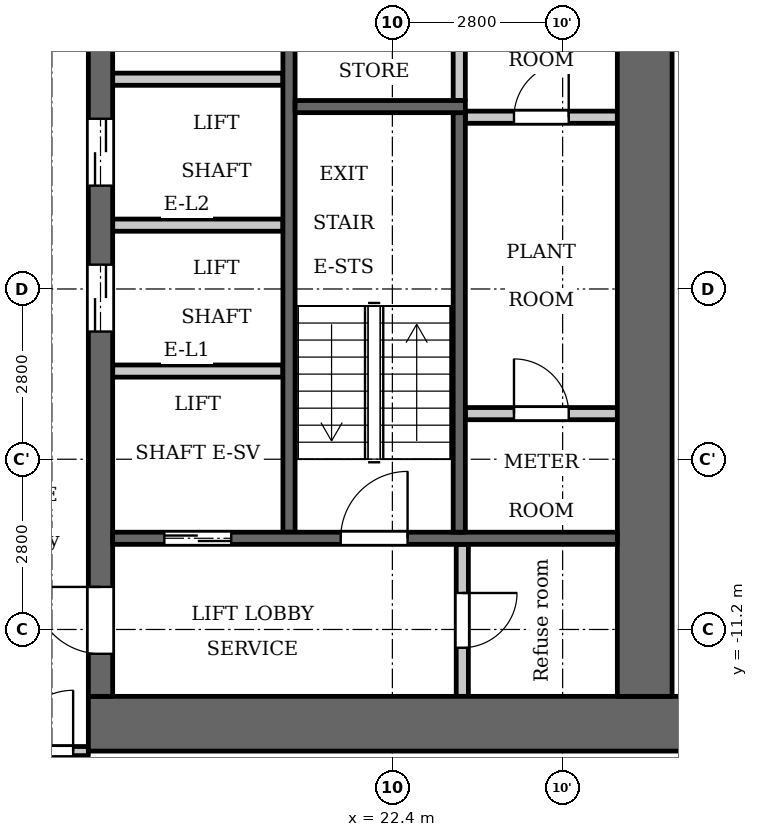
"""IFC4 building model, lengths in metres.
Left out: names, types, materials, properties, quantities, classifications, styles, units other than length and angle.
Written with IfcOpenShell. Run it as: python <this file> out.ifc"""

import sys

from ifc_helpers import new_model, si_unit, direction, frame, frame_2d, origin, place, context, subcontext, project, spatial, rectangle, extrude, element, fill, save


model = new_model("IFC4")
c1 = context("Model", 3, precision=1e-05, world=origin(), true_north=direction((0.0, 1.0)))
c2 = subcontext(c1, "Body", "Model", "MODEL_VIEW")
j1 = project(units=[si_unit("LENGTHUNIT", "METRE"), si_unit("PLANEANGLEUNIT", "RADIAN")], contexts=[c1])
p1 = place(None, origin())
s1 = spatial("IfcSite", under=j1, at=p1, CompositionType="ELEMENT")
p2 = place(p1, origin())
s2 = spatial("IfcBuilding", under=s1, at=p2, CompositionType="ELEMENT")
p3 = place(p2, frame((0.0, 0.0, 83.3)))
s3 = spatial("IfcBuildingStorey", under=s2, at=p3, CompositionType="ELEMENT", Elevation=83.3)
p4 = place(p3, frame((23.5, -2.5, 0.0), z_axis=(0.0, 0.0, 1.0), x_axis=(0.0, 1.0, 0.0)))
e1 = element("IfcWall", 1, at=p4, inside=s3, PredefinedType="PARTITIONING", context=c2, shape_type="SweptSolid", body=[
    extrude(rectangle(XDim=2.65, YDim=0.2, at=frame_2d((1.325, 0.0))), origin(), (0.0, 0.0, 1.0), 3.2),
])
p5 = place(p3, frame((20.7, -9.6, 0.0), z_axis=(0.0, 0.0, 1.0), x_axis=(0.0, 1.0, 0.0)))
e2 = element("IfcWall", 2, at=p5, inside=s3, PredefinedType="SHEAR", context=c2, shape_type="SweptSolid", body=[
    extrude(rectangle(XDim=9.75, YDim=0.2, at=frame_2d((4.875, 0.0))), origin(), (0.0, 0.0, 1.0), 3.2),
])
p6 = place(p3, frame((17.4, -12.75, 0.0), z_axis=(0.0, 0.0, 1.0), x_axis=(1.0, 0.0, 0.0)))
e3 = element("IfcWall", 3, at=p6, inside=s3, PredefinedType="SHEAR", context=c2, shape_type="SweptSolid", body=[
    extrude(rectangle(XDim=10.4, YDim=0.9, at=frame_2d((5.2, 0.0))), origin(), (0.0, 0.0, 1.0), 3.2),
])
p7 = place(p3, frame((17.6, -12.3, 0.0), z_axis=(0.0, 0.0, 1.0), x_axis=(0.0, 1.0, 0.0)))
e4 = element("IfcWall", 4, at=p7, inside=s3, PredefinedType="SHEAR", context=c2, shape_type="SweptSolid", body=[
    extrude(rectangle(XDim=24.6, YDim=0.4, at=frame_2d((12.3, 0.0))), origin(), (0.0, 0.0, 1.0), 3.2),
])
p8 = place(p7, frame((6.0, 0.0, 0.0)))
e5 = element("IfcOpeningElement", 5, at=p8, cuts=e4, PredefinedType="OPENING", context=c2, shape_type="SweptSolid", body=[
    extrude(rectangle(XDim=1.1, YDim=2.1, at=frame_2d((0.55, 1.05))), frame((0.0, 0.21, 0.0), z_axis=(0.0, -1.0, 0.0), x_axis=(1.0, 0.0, 0.0)), (0.0, 0.0, 1.0), 0.42),
])
p9 = place(p7, frame((8.4, 0.0, 0.0)))
e6 = element("IfcOpeningElement", 6, at=p9, cuts=e4, PredefinedType="OPENING", context=c2, shape_type="SweptSolid", body=[
    extrude(rectangle(XDim=1.1, YDim=2.1, at=frame_2d((0.55, 1.05))), frame((0.0, 0.21, 0.0), z_axis=(0.0, -1.0, 0.0), x_axis=(1.0, 0.0, 0.0)), (0.0, 0.0, 1.0), 0.42),
])
p10 = place(p7, frame((10.8, 0.0, 0.0)))
e7 = element("IfcOpeningElement", 7, at=p10, cuts=e4, PredefinedType="OPENING", context=c2, shape_type="SweptSolid", body=[
    extrude(rectangle(XDim=1.1, YDim=2.1, at=frame_2d((0.55, 1.05))), frame((0.0, 0.21, 0.0), z_axis=(0.0, -1.0, 0.0), x_axis=(1.0, 0.0, 0.0)), (0.0, 0.0, 1.0), 0.42),
])
p11 = place(p7, frame((16.75, 0.0, 0.0)))
e8 = element("IfcOpeningElement", 8, at=p11, cuts=e4, PredefinedType="OPENING", context=c2, shape_type="SweptSolid", body=[
    extrude(rectangle(XDim=0.9, YDim=2.1, at=frame_2d((0.45, 1.05))), frame((0.0, 0.21, 0.0), z_axis=(0.0, -1.0, 0.0), x_axis=(1.0, 0.0, 0.0)), (0.0, 0.0, 1.0), 0.42),
])
p12 = place(p7, frame((22.8, 0.0, 0.0)))
e9 = element("IfcOpeningElement", 9, at=p12, cuts=e4, PredefinedType="OPENING", context=c2, shape_type="SweptSolid", body=[
    extrude(rectangle(XDim=1.1, YDim=2.1, at=frame_2d((0.55, 1.05))), frame((0.0, 0.21, 0.0), z_axis=(0.0, -1.0, 0.0), x_axis=(1.0, 0.0, 0.0)), (0.0, 0.0, 1.0), 0.42),
])
p13 = place(p7, frame((0.7, 0.0, 0.0)))
e10 = element("IfcOpeningElement", 10, at=p13, cuts=e4, PredefinedType="OPENING", context=c2, shape_type="SweptSolid", body=[
    extrude(rectangle(XDim=1.1, YDim=2.1, at=frame_2d((0.55, 1.05))), frame((0.0, 0.21, 0.0), z_axis=(0.0, -1.0, 0.0), x_axis=(1.0, 0.0, 0.0)), (0.0, 0.0, 1.0), 0.42),
])
p14 = place(p7, frame((12.775, 0.0, 0.0)))
e11 = element("IfcOpeningElement", 11, at=p14, cuts=e4, PredefinedType="OPENING", context=c2, shape_type="SweptSolid", body=[
    extrude(rectangle(XDim=1.8, YDim=2.1, at=frame_2d((0.9, 1.05))), frame((0.0, 0.21, 0.0), z_axis=(0.0, -1.0, 0.0), x_axis=(1.0, 0.0, 0.0)), (0.0, 0.0, 1.0), 0.42),
])
p15 = place(p3, frame((26.55, -12.3, 0.0), z_axis=(0.0, 0.0, 1.0), x_axis=(0.0, 1.0, 0.0)))
e12 = element("IfcWall", 12, at=p15, inside=s3, PredefinedType="SHEAR", context=c2, shape_type="SweptSolid", body=[
    extrude(rectangle(XDim=24.6, YDim=0.9, at=frame_2d((12.3, 0.0))), origin(), (0.0, 0.0, 1.0), 3.2),
])
p16 = place(p3, frame((23.55, -12.3, 0.0), z_axis=(0.0, 0.0, 1.0), x_axis=(0.0, 1.0, 0.0)))
e13 = element("IfcWall", 13, at=p16, inside=s3, PredefinedType="PARTITIONING", context=c2, shape_type="SweptSolid", body=[
    extrude(rectangle(XDim=2.5, YDim=0.2, at=frame_2d((1.25, 0.0))), origin(), (0.0, 0.0, 1.0), 3.2),
])
p17 = place(p16, frame((0.8, 0.0, 0.0)))
e14 = element("IfcOpeningElement", 14, at=p17, cuts=e13, PredefinedType="OPENING", context=c2, shape_type="SweptSolid", body=[
    extrude(rectangle(XDim=0.9, YDim=2.1, at=frame_2d((0.45, 1.05))), frame((0.0, 0.11, 0.0), z_axis=(0.0, -1.0, 0.0), x_axis=(1.0, 0.0, 0.0)), (0.0, 0.0, 1.0), 0.22),
])
p18 = place(p3, frame((23.6, -7.65, 0.0), z_axis=(0.0, 0.0, 1.0), x_axis=(1.0, 0.0, 0.0)))
e15 = element("IfcWall", 15, at=p18, inside=s3, PredefinedType="PARTITIONING", context=c2, shape_type="SweptSolid", body=[
    extrude(rectangle(XDim=2.5, YDim=0.2, at=frame_2d((1.25, 0.0))), origin(), (0.0, 0.0, 1.0), 3.2),
])
p19 = place(p18, frame((0.8, 0.0, 0.0)))
e16 = element("IfcOpeningElement", 16, at=p19, cuts=e15, PredefinedType="OPENING", context=c2, shape_type="SweptSolid", body=[
    extrude(rectangle(XDim=0.9, YDim=2.1, at=frame_2d((0.45, 1.05))), frame((0.0, 0.11, 0.0), z_axis=(0.0, -1.0, 0.0), x_axis=(1.0, 0.0, 0.0)), (0.0, 0.0, 1.0), 0.22),
])
p20 = place(p3, frame((23.6, -2.775, 0.0), z_axis=(0.0, 0.0, 1.0), x_axis=(1.0, 0.0, 0.0)))
e17 = element("IfcWall", 17, at=p20, inside=s3, PredefinedType="PARTITIONING", context=c2, shape_type="SweptSolid", body=[
    extrude(rectangle(XDim=2.5, YDim=0.2, at=frame_2d((1.25, 0.0))), origin(), (0.0, 0.0, 1.0), 3.2),
])
p21 = place(p20, frame((0.8, 0.0, 0.0)))
e18 = element("IfcOpeningElement", 18, at=p21, cuts=e17, PredefinedType="OPENING", context=c2, shape_type="SweptSolid", body=[
    extrude(rectangle(XDim=0.9, YDim=2.1, at=frame_2d((0.45, 1.05))), frame((0.0, 0.11, 0.0), z_axis=(0.0, -1.0, 0.0), x_axis=(1.0, 0.0, 0.0)), (0.0, 0.0, 1.0), 0.22),
])
p22 = place(p3, frame((17.8, -9.7, 0.0), z_axis=(0.0, 0.0, 1.0), x_axis=(1.0, 0.0, 0.0)))
e19 = element("IfcWall", 19, at=p22, inside=s3, PredefinedType="SHEAR", context=c2, shape_type="SweptSolid", body=[
    extrude(rectangle(XDim=8.3, YDim=0.2, at=frame_2d((4.15, 0.0))), origin(), (0.0, 0.0, 1.0), 3.2),
])
p23 = place(p22, frame((0.85, 0.0, 0.0)))
e20 = element("IfcOpeningElement", 20, at=p23, cuts=e19, PredefinedType="OPENING", context=c2, shape_type="SweptSolid", body=[
    extrude(rectangle(XDim=1.1, YDim=2.1, at=frame_2d((0.55, 1.05))), frame((0.0, 0.11, 0.0), z_axis=(0.0, -1.0, 0.0), x_axis=(1.0, 0.0, 0.0)), (0.0, 0.0, 1.0), 0.22),
])
p24 = place(p22, frame((3.75, 0.0, 0.0)))
e21 = element("IfcOpeningElement", 21, at=p24, cuts=e19, PredefinedType="OPENING", context=c2, shape_type="SweptSolid", body=[
    extrude(rectangle(XDim=1.1, YDim=2.1, at=frame_2d((0.55, 1.05))), frame((0.0, 0.11, 0.0), z_axis=(0.0, -1.0, 0.0), x_axis=(1.0, 0.0, 0.0)), (0.0, 0.0, 1.0), 0.22),
])
for number, where, z_axis, x_axis in (
    (22, (17.8, -6.95, 0.0), (0.0, 0.0, 1.0), (1.0, 0.0, 0.0)),
    (23, (17.8, -4.55, 0.0), (0.0, 0.0, 1.0), (1.0, 0.0, 0.0)),
    (24, (17.8, -2.15, 0.0), (0.0, 0.0, 1.0), (1.0, 0.0, 0.0)),
):
    element("IfcWall", number, at=place(p3, frame(where, z_axis=z_axis, x_axis=x_axis)), inside=s3, PredefinedType="PARTITIONING", context=c2, shape_type="SweptSolid", body=[
        extrude(rectangle(XDim=2.8, YDim=0.2, at=frame_2d((1.4, 0.0))), origin(), (0.0, 0.0, 1.0), 3.2),
    ])
p25 = place(p3, frame((23.5, -9.6, 0.0), z_axis=(0.0, 0.0, 1.0), x_axis=(0.0, 1.0, 0.0)))
e25 = element("IfcWall", 25, at=p25, inside=s3, PredefinedType="SHEAR", context=c2, shape_type="SweptSolid", body=[
    extrude(rectangle(XDim=6.9, YDim=0.2, at=frame_2d((3.45, 0.0))), origin(), (0.0, 0.0, 1.0), 3.2),
])
p26 = place(p3, frame((20.8, -2.6, 0.0), z_axis=(0.0, 0.0, 1.0), x_axis=(1.0, 0.0, 0.0)))
e26 = element("IfcWall", 26, at=p26, inside=s3, PredefinedType="SHEAR", context=c2, shape_type="SweptSolid", body=[
    extrude(rectangle(XDim=2.8, YDim=0.2, at=frame_2d((1.4, 0.0))), origin(), (0.0, 0.0, 1.0), 3.2),
])
p27 = place(p3, frame((-17.4, -13.2, 0.0), z_axis=(0.0, 0.0, 1.0), x_axis=(1.0, 0.0, 0.0)))
e27 = element("IfcWall", 27, at=p27, inside=s3, PredefinedType="PARTITIONING", context=c2, shape_type="SweptSolid", body=[
    extrude(rectangle(XDim=34.8, YDim=0.15, at=frame_2d((17.4, 0.0))), origin(), (0.0, 0.0, 1.0), 3.2),
])
p28 = place(p27, frame((0.15, 0.0, 0.0)))
e28 = element("IfcOpeningElement", 28, at=p28, cuts=e27, PredefinedType="OPENING", context=c2, shape_type="SweptSolid", body=[
    extrude(rectangle(XDim=1.0, YDim=2.1, at=frame_2d((0.5, 1.05))), frame((0.0, 0.085, 0.0), z_axis=(0.0, -1.0, 0.0), x_axis=(1.0, 0.0, 0.0)), (0.0, 0.0, 1.0), 0.17),
])
p29 = place(p27, frame((33.55, 0.0, 0.0)))
e29 = element("IfcOpeningElement", 29, at=p29, cuts=e27, PredefinedType="OPENING", context=c2, shape_type="SweptSolid", body=[
    extrude(rectangle(XDim=1.0, YDim=2.1, at=frame_2d((0.5, 1.05))), frame((0.0, 0.085, 0.0), z_axis=(0.0, -1.0, 0.0), x_axis=(1.0, 0.0, 0.0)), (0.0, 0.0, 1.0), 0.17),
])
p30 = place(p27, frame((7.35, 0.0, 0.0)))
e30 = element("IfcOpeningElement", 30, at=p30, cuts=e27, PredefinedType="OPENING", context=c2, shape_type="SweptSolid", body=[
    extrude(rectangle(XDim=1.0, YDim=2.1, at=frame_2d((0.5, 1.05))), frame((0.0, 0.085, 0.0), z_axis=(0.0, -1.0, 0.0), x_axis=(1.0, 0.0, 0.0)), (0.0, 0.0, 1.0), 0.17),
])
p31 = place(p27, frame((13.7, 0.0, 0.0)))
e31 = element("IfcOpeningElement", 31, at=p31, cuts=e27, PredefinedType="OPENING", context=c2, shape_type="SweptSolid", body=[
    extrude(rectangle(XDim=1.0, YDim=2.1, at=frame_2d((0.5, 1.05))), frame((0.0, 0.085, 0.0), z_axis=(0.0, -1.0, 0.0), x_axis=(1.0, 0.0, 0.0)), (0.0, 0.0, 1.0), 0.17),
])
p32 = place(p27, frame((19.3, 0.0, 0.0)))
e32 = element("IfcOpeningElement", 32, at=p32, cuts=e27, PredefinedType="OPENING", context=c2, shape_type="SweptSolid", body=[
    extrude(rectangle(XDim=1.0, YDim=2.1, at=frame_2d((0.5, 1.05))), frame((0.0, 0.085, 0.0), z_axis=(0.0, -1.0, 0.0), x_axis=(1.0, 0.0, 0.0)), (0.0, 0.0, 1.0), 0.17),
])
p33 = place(p23, origin())
e33 = element("IfcDoor", 33, at=p33, inside=s3, OperationType="DOUBLE_DOOR_SLIDING", PredefinedType="DOOR", context=c2, shape_type="SweptSolid", body=[
    extrude(rectangle(XDim=1.1, YDim=2.1, at=frame_2d((0.55, 1.05))), frame((0.0, 0.025, 0.0), z_axis=(0.0, -1.0, 0.0), x_axis=(1.0, 0.0, 0.0)), (0.0, 0.0, 1.0), 0.05),
])
fill(e20, e33)
p34 = place(p8, origin())
e34 = element("IfcDoor", 34, at=p34, inside=s3, OperationType="DOUBLE_DOOR_SLIDING", PredefinedType="DOOR", context=c2, shape_type="SweptSolid", body=[
    extrude(rectangle(XDim=1.1, YDim=2.1, at=frame_2d((0.55, 1.05))), frame((0.0, 0.025, 0.0), z_axis=(0.0, -1.0, 0.0), x_axis=(1.0, 0.0, 0.0)), (0.0, 0.0, 1.0), 0.05),
])
fill(e5, e34)
p35 = place(p9, origin())
e35 = element("IfcDoor", 35, at=p35, inside=s3, OperationType="DOUBLE_DOOR_SLIDING", PredefinedType="DOOR", context=c2, shape_type="SweptSolid", body=[
    extrude(rectangle(XDim=1.1, YDim=2.1, at=frame_2d((0.55, 1.05))), frame((0.0, 0.025, 0.0), z_axis=(0.0, -1.0, 0.0), x_axis=(1.0, 0.0, 0.0)), (0.0, 0.0, 1.0), 0.05),
])
fill(e6, e35)
p36 = place(p13, origin())
e36 = element("IfcDoor", 36, at=p36, inside=s3, OperationType="SINGLE_SWING_LEFT", PredefinedType="DOOR", context=c2, shape_type="SweptSolid", body=[
    extrude(rectangle(XDim=1.1, YDim=2.1, at=frame_2d((0.55, 1.05))), frame((0.0, 0.025, 0.0), z_axis=(0.0, -1.0, 0.0), x_axis=(1.0, 0.0, 0.0)), (0.0, 0.0, 1.0), 0.05),
])
fill(e10, e36)
p37 = place(p17, origin())
e37 = element("IfcDoor", 37, at=p37, inside=s3, OperationType="SINGLE_SWING_RIGHT", PredefinedType="DOOR", context=c2, shape_type="SweptSolid", body=[
    extrude(rectangle(XDim=0.9, YDim=2.1, at=frame_2d((0.45, 1.05))), frame((0.0, 0.025, 0.0), z_axis=(0.0, -1.0, 0.0), x_axis=(1.0, 0.0, 0.0)), (0.0, 0.0, 1.0), 0.05),
])
fill(e14, e37)
p38 = place(p24, origin())
e38 = element("IfcDoor", 38, at=p38, inside=s3, OperationType="SINGLE_SWING_LEFT", PredefinedType="DOOR", context=c2, shape_type="SweptSolid", body=[
    extrude(rectangle(XDim=1.1, YDim=2.1, at=frame_2d((0.55, 1.05))), frame((0.0, 0.025, 0.0), z_axis=(0.0, -1.0, 0.0), x_axis=(1.0, 0.0, 0.0)), (0.0, 0.0, 1.0), 0.05),
])
fill(e21, e38)
p39 = place(p19, origin())
e39 = element("IfcDoor", 39, at=p39, inside=s3, OperationType="SINGLE_SWING_RIGHT", PredefinedType="DOOR", context=c2, shape_type="SweptSolid", body=[
    extrude(rectangle(XDim=0.9, YDim=2.1, at=frame_2d((0.45, 1.05))), frame((0.0, 0.025, 0.0), z_axis=(0.0, -1.0, 0.0), x_axis=(1.0, 0.0, 0.0)), (0.0, 0.0, 1.0), 0.05),
])
fill(e16, e39)
p40 = place(p21, origin())
e40 = element("IfcDoor", 40, at=p40, inside=s3, OperationType="SINGLE_SWING_LEFT", PredefinedType="DOOR", context=c2, shape_type="SweptSolid", body=[
    extrude(rectangle(XDim=0.9, YDim=2.1, at=frame_2d((0.45, 1.05))), frame((0.0, 0.025, 0.0), z_axis=(0.0, -1.0, 0.0), x_axis=(1.0, 0.0, 0.0)), (0.0, 0.0, 1.0), 0.05),
])
fill(e18, e40)
p41 = place(p29, origin())
e41 = element("IfcDoor", 41, at=p41, inside=s3, OperationType="SINGLE_SWING_LEFT", PredefinedType="DOOR", context=c2, shape_type="SweptSolid", body=[
    extrude(rectangle(XDim=1.0, YDim=2.1, at=frame_2d((0.5, 1.05))), frame((0.0, 0.025, 0.0), z_axis=(0.0, -1.0, 0.0), x_axis=(1.0, 0.0, 0.0)), (0.0, 0.0, 1.0), 0.05),
])
fill(e29, e41)
save(model, sys.argv[1])
